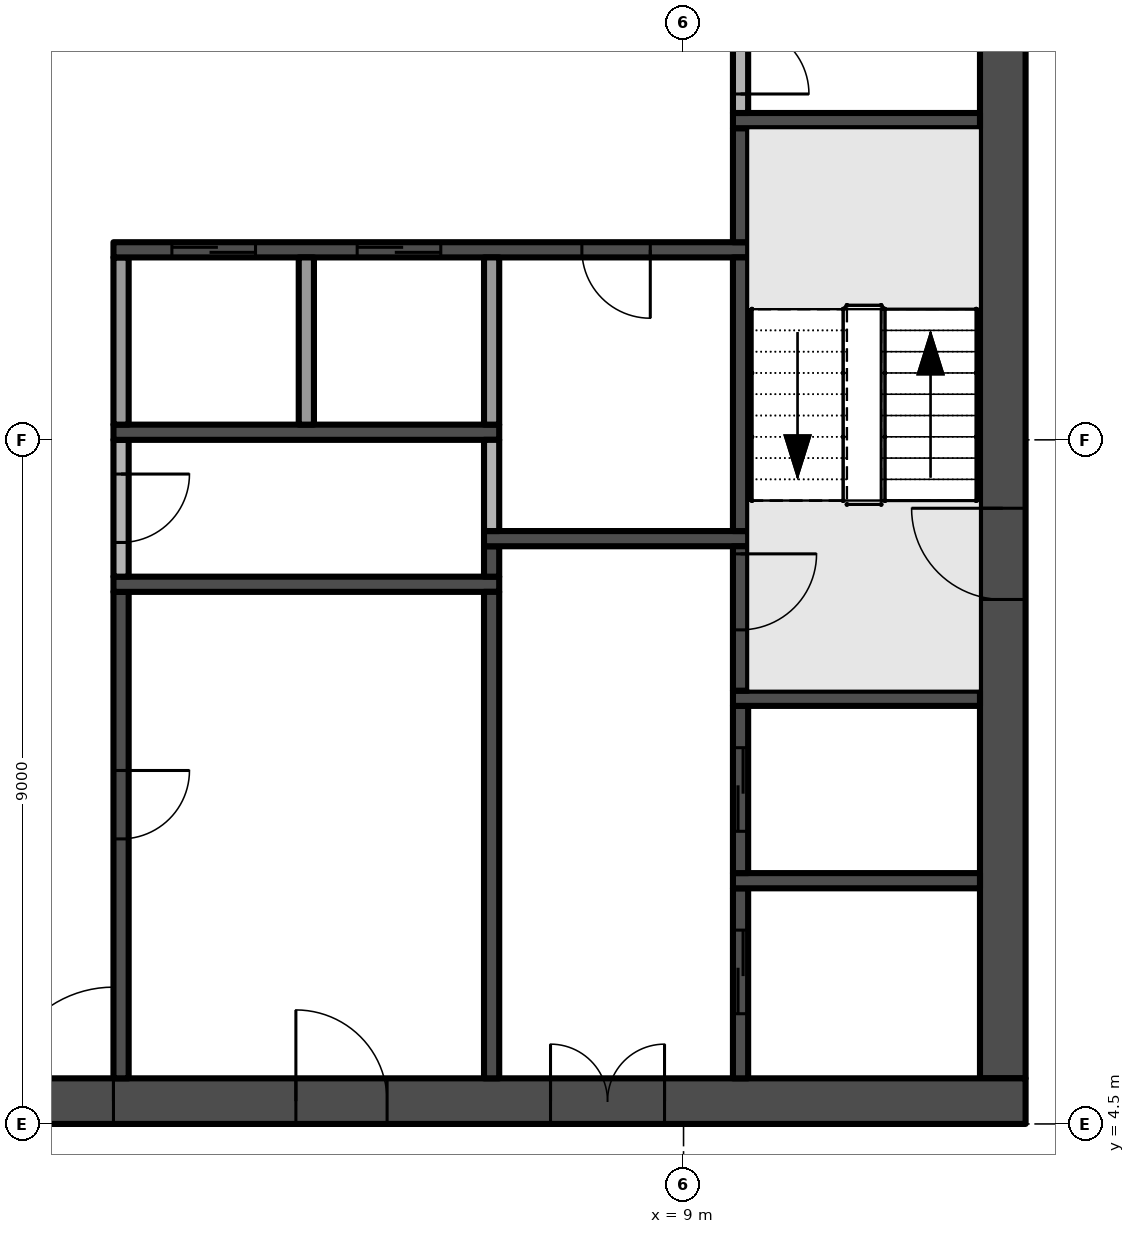
"""IFC4 building model, lengths in metres.
Left out: names, types, materials, properties, quantities, classifications, styles, units other than length and angle.
Written with IfcOpenShell. Run it as: python <this file> out.ifc"""

import sys

from ifc_helpers import new_model, si_unit, direction, frame, frame_2d, origin, place, context, subcontext, project, spatial, rectangle, extrude, element, fill, save


model = new_model("IFC4")
c1 = context("Model", 3, precision=1e-05, world=origin(), true_north=direction((0.0, 1.0)))
c2 = subcontext(c1, "Body", "Model", "MODEL_VIEW")
j1 = project(units=[si_unit("LENGTHUNIT", "METRE"), si_unit("PLANEANGLEUNIT", "RADIAN")], contexts=[c1])
p1 = place(None, origin())
s1 = spatial("IfcSite", under=j1, at=p1, CompositionType="ELEMENT")
p2 = place(p1, origin())
s2 = spatial("IfcBuilding", under=s1, at=p2, CompositionType="ELEMENT")
p3 = place(p2, frame((0.0, 0.0, 284.4)))
s3 = spatial("IfcBuildingStorey", under=s2, at=p3, CompositionType="ELEMENT", Elevation=284.4)
p4 = place(p3, frame((-13.5, 4.8, -0.3), z_axis=(0.0, 0.0, 1.0), x_axis=(1.0, 0.0, 0.0)))
e1 = element("IfcWall", 1, at=p4, inside=s3, PredefinedType="SHEAR", context=c2, shape_type="SweptSolid", body=[
    extrude(rectangle(XDim=27.0, YDim=0.6, at=frame_2d((13.5, 0.0))), origin(), (0.0, 0.0, 1.0), 5.0),
])
p5 = place(p4, frame((12.0, 0.0, 0.3)))
e2 = element("IfcOpeningElement", 2, at=p5, cuts=e1, PredefinedType="OPENING", context=c2, shape_type="SweptSolid", body=[
    extrude(rectangle(XDim=3.0, YDim=2.4, at=frame_2d((1.5, 1.2))), frame((0.0, 0.31, 0.0), z_axis=(0.0, -1.0, 0.0), x_axis=(1.0, 0.0, 0.0)), (0.0, 0.0, 1.0), 0.62),
])
p6 = place(p4, frame((4.9, 0.0, 0.3)))
e3 = element("IfcOpeningElement", 3, at=p6, cuts=e1, PredefinedType="OPENING", context=c2, shape_type="SweptSolid", body=[
    extrude(rectangle(XDim=1.2, YDim=2.2, at=frame_2d((0.6, 1.1))), frame((0.0, 0.31, 0.0), z_axis=(0.0, -1.0, 0.0), x_axis=(1.0, 0.0, 0.0)), (0.0, 0.0, 1.0), 0.62),
])
p7 = place(p4, frame((20.75, 0.0, 0.3)))
e4 = element("IfcOpeningElement", 4, at=p7, cuts=e1, PredefinedType="OPENING", context=c2, shape_type="SweptSolid", body=[
    extrude(rectangle(XDim=1.5, YDim=2.2, at=frame_2d((0.75, 1.1))), frame((0.0, 0.31, 0.0), z_axis=(0.0, -1.0, 0.0), x_axis=(1.0, 0.0, 0.0)), (0.0, 0.0, 1.0), 0.62),
])
p8 = place(p4, frame((17.4, 0.0, 0.3)))
e5 = element("IfcOpeningElement", 5, at=p8, cuts=e1, PredefinedType="OPENING", context=c2, shape_type="SweptSolid", body=[
    extrude(rectangle(XDim=1.2, YDim=2.2, at=frame_2d((0.6, 1.1))), frame((0.0, 0.31, 0.0), z_axis=(0.0, -1.0, 0.0), x_axis=(1.0, 0.0, 0.0)), (0.0, 0.0, 1.0), 0.62),
])
p9 = place(p3, frame((13.2, 5.1, -0.3), z_axis=(0.0, 0.0, 1.0), x_axis=(0.0, 1.0, 0.0)))
e6 = element("IfcWall", 6, at=p9, inside=s3, PredefinedType="SHEAR", context=c2, shape_type="SweptSolid", body=[
    extrude(rectangle(XDim=16.8, YDim=0.6, at=frame_2d((8.4, 0.0))), origin(), (0.0, 0.0, 1.0), 5.0),
])
p10 = place(p9, frame((6.3, 0.0, 0.3)))
e7 = element("IfcOpeningElement", 7, at=p10, cuts=e6, PredefinedType="OPENING", context=c2, shape_type="SweptSolid", body=[
    extrude(rectangle(XDim=1.2, YDim=2.2, at=frame_2d((0.6, 1.1))), frame((0.0, 0.31, 0.0), z_axis=(0.0, -1.0, 0.0), x_axis=(1.0, 0.0, 0.0)), (0.0, 0.0, 1.0), 0.62),
])
p11 = place(p3, frame((1.6, 11.5, 0.0), z_axis=(0.0, 0.0, 1.0), x_axis=(0.0, -1.0, 0.0)))
e8 = element("IfcWall", 8, at=p11, inside=s3, PredefinedType="SHEAR", context=c2, shape_type="SweptSolid", body=[
    extrude(rectangle(XDim=6.4, YDim=0.2, at=frame_2d((3.2, 0.0))), origin(), (0.0, 0.0, 1.0), 4.7),
])
p12 = place(p11, frame((2.35, 0.0, 0.0)))
e9 = element("IfcOpeningElement", 9, at=p12, cuts=e8, PredefinedType="OPENING", context=c2, shape_type="SweptSolid", body=[
    extrude(rectangle(XDim=0.9, YDim=2.1, at=frame_2d((0.45, 1.05))), frame((0.0, 0.11, 0.0), z_axis=(0.0, -1.0, 0.0), x_axis=(1.0, 0.0, 0.0)), (0.0, 0.0, 1.0), 0.22),
])
p13 = place(p3, frame((1.5, 11.6, 0.0), z_axis=(0.0, 0.0, 1.0), x_axis=(1.0, 0.0, 0.0)))
e10 = element("IfcWall", 10, at=p13, inside=s3, PredefinedType="SHEAR", context=c2, shape_type="SweptSolid", body=[
    extrude(rectangle(XDim=5.075, YDim=0.2, at=frame_2d((2.538, 0.0))), origin(), (0.0, 0.0, 1.0), 4.7),
])
p14 = place(p3, frame((1.6, 13.5, 0.0), z_axis=(0.0, 0.0, 1.0), x_axis=(0.0, -1.0, 0.0)))
e11 = element("IfcWall", 11, at=p14, inside=s3, PredefinedType="PARTITIONING", context=c2, shape_type="SweptSolid", body=[
    extrude(rectangle(XDim=1.8, YDim=0.2, at=frame_2d((0.9, 0.0))), origin(), (0.0, 0.0, 1.0), 4.7),
])
p15 = place(p14, frame((0.45, 0.0, 0.0)))
e12 = element("IfcOpeningElement", 12, at=p15, cuts=e11, PredefinedType="OPENING", context=c2, shape_type="SweptSolid", body=[
    extrude(rectangle(XDim=0.9, YDim=2.1, at=frame_2d((0.45, 1.05))), frame((0.0, 0.11, 0.0), z_axis=(0.0, -1.0, 0.0), x_axis=(1.0, 0.0, 0.0)), (0.0, 0.0, 1.0), 0.22),
])
p16 = place(p3, frame((1.5, 13.6, 0.0), z_axis=(0.0, 0.0, 1.0), x_axis=(1.0, 0.0, 0.0)))
e13 = element("IfcWall", 13, at=p16, inside=s3, PredefinedType="SHEAR", context=c2, shape_type="SweptSolid", body=[
    extrude(rectangle(XDim=5.075, YDim=0.2, at=frame_2d((2.538, 0.0))), origin(), (0.0, 0.0, 1.0), 4.7),
])
p17 = place(p3, frame((1.6, 13.7, 0.0), z_axis=(0.0, 0.0, 1.0), x_axis=(0.0, 1.0, 0.0)))
e14 = element("IfcWall", 14, at=p17, inside=s3, PredefinedType="PARTITIONING", context=c2, shape_type="SweptSolid", body=[
    extrude(rectangle(XDim=2.2, YDim=0.2, at=frame_2d((1.1, 0.0))), origin(), (0.0, 0.0, 1.0), 4.7),
])
p18 = place(p3, frame((9.85, 16.0, 0.0), z_axis=(0.0, 0.0, 1.0), x_axis=(-1.0, 0.0, 0.0)))
e15 = element("IfcWall", 15, at=p18, inside=s3, PredefinedType="SHEAR", context=c2, shape_type="SweptSolid", body=[
    extrude(rectangle(XDim=8.35, YDim=0.2, at=frame_2d((4.175, 0.0))), origin(), (0.0, 0.0, 1.0), 4.7),
])
p19 = place(p18, frame((6.481, 0.0, 0.0)))
e16 = element("IfcOpeningElement", 16, at=p19, cuts=e15, PredefinedType="OPENING", context=c2, shape_type="SweptSolid", body=[
    extrude(rectangle(XDim=1.1, YDim=2.1, at=frame_2d((0.55, 1.05))), frame((0.0, 0.11, 0.0), z_axis=(0.0, -1.0, 0.0), x_axis=(1.0, 0.0, 0.0)), (0.0, 0.0, 1.0), 0.22),
])
p20 = place(p18, frame((4.044, 0.0, 0.0)))
e17 = element("IfcOpeningElement", 17, at=p20, cuts=e15, PredefinedType="OPENING", context=c2, shape_type="SweptSolid", body=[
    extrude(rectangle(XDim=1.1, YDim=2.1, at=frame_2d((0.55, 1.05))), frame((0.0, 0.11, 0.0), z_axis=(0.0, -1.0, 0.0), x_axis=(1.0, 0.0, 0.0)), (0.0, 0.0, 1.0), 0.22),
])
p21 = place(p18, frame((1.288, 0.0, 0.0)))
e18 = element("IfcOpeningElement", 18, at=p21, cuts=e15, PredefinedType="OPENING", context=c2, shape_type="SweptSolid", body=[
    extrude(rectangle(XDim=0.9, YDim=2.1, at=frame_2d((0.45, 1.05))), frame((0.0, 0.11, 0.0), z_axis=(0.0, -1.0, 0.0), x_axis=(1.0, 0.0, 0.0)), (0.0, 0.0, 1.0), 0.22),
])
p22 = place(p3, frame((4.037, 13.7, 0.0), z_axis=(0.0, 0.0, 1.0), x_axis=(0.0, 1.0, 0.0)))
e19 = element("IfcWall", 19, at=p22, inside=s3, PredefinedType="PARTITIONING", context=c2, shape_type="SweptSolid", body=[
    extrude(rectangle(XDim=2.2, YDim=0.2, at=frame_2d((1.1, 0.0))), origin(), (0.0, 0.0, 1.0), 4.7),
])
p23 = place(p3, frame((6.475, 5.1, 0.0), z_axis=(0.0, 0.0, 1.0), x_axis=(0.0, 1.0, 0.0)))
e20 = element("IfcWall", 20, at=p23, inside=s3, PredefinedType="SHEAR", context=c2, shape_type="SweptSolid", body=[
    extrude(rectangle(XDim=6.4, YDim=0.2, at=frame_2d((3.2, 0.0))), origin(), (0.0, 0.0, 1.0), 4.7),
])
p24 = place(p3, frame((6.475, 11.7, 0.0), z_axis=(0.0, 0.0, 1.0), x_axis=(0.0, 1.0, 0.0)))
e21 = element("IfcWall", 21, at=p24, inside=s3, PredefinedType="SHEAR", context=c2, shape_type="SweptSolid", body=[
    extrude(rectangle(XDim=0.4, YDim=0.2, at=frame_2d((0.2, 0.0))), origin(), (0.0, 0.0, 1.0), 4.7),
])
p25 = place(p3, frame((6.375, 12.2, 0.0), z_axis=(0.0, 0.0, 1.0), x_axis=(1.0, 0.0, 0.0)))
e22 = element("IfcWall", 22, at=p25, inside=s3, PredefinedType="SHEAR", context=c2, shape_type="SweptSolid", body=[
    extrude(rectangle(XDim=3.475, YDim=0.2, at=frame_2d((1.738, 0.0))), origin(), (0.0, 0.0, 1.0), 4.7),
])
p26 = place(p3, frame((6.475, 12.3, 0.0), z_axis=(0.0, 0.0, 1.0), x_axis=(0.0, 1.0, 0.0)))
e23 = element("IfcWall", 23, at=p26, inside=s3, PredefinedType="PARTITIONING", context=c2, shape_type="SweptSolid", body=[
    extrude(rectangle(XDim=1.2, YDim=0.2, at=frame_2d((0.6, 0.0))), origin(), (0.0, 0.0, 1.0), 4.7),
])
p27 = place(p3, frame((6.475, 13.7, 0.0), z_axis=(0.0, 0.0, 1.0), x_axis=(0.0, 1.0, 0.0)))
e24 = element("IfcWall", 24, at=p27, inside=s3, PredefinedType="PARTITIONING", context=c2, shape_type="SweptSolid", body=[
    extrude(rectangle(XDim=2.2, YDim=0.2, at=frame_2d((1.1, 0.0))), origin(), (0.0, 0.0, 1.0), 4.7),
])
p28 = place(p3, frame((9.75, 5.1, 0.0), z_axis=(0.0, 0.0, 1.0), x_axis=(0.0, 1.0, 0.0)))
e25 = element("IfcWall", 25, at=p28, inside=s3, PredefinedType="SHEAR", context=c2, shape_type="SweptSolid", body=[
    extrude(rectangle(XDim=2.5, YDim=0.2, at=frame_2d((1.25, 0.0))), origin(), (0.0, 0.0, 1.0), 4.7),
])
p29 = place(p28, frame((0.85, 0.0, 0.0)))
e26 = element("IfcOpeningElement", 26, at=p29, cuts=e25, PredefinedType="OPENING", context=c2, shape_type="SweptSolid", body=[
    extrude(rectangle(XDim=1.1, YDim=2.1, at=frame_2d((0.55, 1.05))), frame((0.0, 0.11, 0.0), z_axis=(0.0, -1.0, 0.0), x_axis=(1.0, 0.0, 0.0)), (0.0, 0.0, 1.0), 0.22),
])
p30 = place(p3, frame((9.65, 7.7, 0.0), z_axis=(0.0, 0.0, 1.0), x_axis=(1.0, 0.0, 0.0)))
e27 = element("IfcWall", 27, at=p30, inside=s3, PredefinedType="SHEAR", context=c2, shape_type="SweptSolid", body=[
    extrude(rectangle(XDim=3.25, YDim=0.2, at=frame_2d((1.625, 0.0))), origin(), (0.0, 0.0, 1.0), 4.7),
])
p31 = place(p3, frame((9.75, 7.8, 0.0), z_axis=(0.0, 0.0, 1.0), x_axis=(0.0, 1.0, 0.0)))
e28 = element("IfcWall", 28, at=p31, inside=s3, PredefinedType="SHEAR", context=c2, shape_type="SweptSolid", body=[
    extrude(rectangle(XDim=2.2, YDim=0.2, at=frame_2d((1.1, 0.0))), origin(), (0.0, 0.0, 1.0), 4.7),
])
p32 = place(p31, frame((0.55, 0.0, 0.0)))
e29 = element("IfcOpeningElement", 29, at=p32, cuts=e28, PredefinedType="OPENING", context=c2, shape_type="SweptSolid", body=[
    extrude(rectangle(XDim=1.1, YDim=2.1, at=frame_2d((0.55, 1.05))), frame((0.0, 0.11, 0.0), z_axis=(0.0, -1.0, 0.0), x_axis=(1.0, 0.0, 0.0)), (0.0, 0.0, 1.0), 0.22),
])
p33 = place(p3, frame((9.65, 10.1, 0.0), z_axis=(0.0, 0.0, 1.0), x_axis=(1.0, 0.0, 0.0)))
e30 = element("IfcWall", 30, at=p33, inside=s3, PredefinedType="SHEAR", context=c2, shape_type="SweptSolid", body=[
    extrude(rectangle(XDim=3.25, YDim=0.2, at=frame_2d((1.625, 0.0))), origin(), (0.0, 0.0, 1.0), 4.7),
])
p34 = place(p3, frame((9.75, 12.1, 0.0), z_axis=(0.0, 0.0, 1.0), x_axis=(0.0, -1.0, 0.0)))
e31 = element("IfcWall", 31, at=p34, inside=s3, PredefinedType="SHEAR", context=c2, shape_type="SweptSolid", body=[
    extrude(rectangle(XDim=1.9, YDim=0.2, at=frame_2d((0.95, 0.0))), origin(), (0.0, 0.0, 1.0), 4.7),
])
p35 = place(p34, frame((0.1, 0.0, 0.0)))
e32 = element("IfcOpeningElement", 32, at=p35, cuts=e31, PredefinedType="OPENING", context=c2, shape_type="SweptSolid", body=[
    extrude(rectangle(XDim=1.0, YDim=2.2, at=frame_2d((0.5, 1.1))), frame((0.0, 0.11, 0.0), z_axis=(0.0, -1.0, 0.0), x_axis=(1.0, 0.0, 0.0)), (0.0, 0.0, 1.0), 0.22),
])
p36 = place(p3, frame((9.75, 12.3, 0.0), z_axis=(0.0, 0.0, 1.0), x_axis=(0.0, 1.0, 0.0)))
e33 = element("IfcWall", 33, at=p36, inside=s3, PredefinedType="SHEAR", context=c2, shape_type="SweptSolid", body=[
    extrude(rectangle(XDim=3.6, YDim=0.2, at=frame_2d((1.8, 0.0))), origin(), (0.0, 0.0, 1.0), 4.7),
])
p37 = place(p3, frame((9.75, 16.1, 0.0), z_axis=(0.0, 0.0, 1.0), x_axis=(0.0, 1.0, 0.0)))
e34 = element("IfcWall", 34, at=p37, inside=s3, PredefinedType="SHEAR", context=c2, shape_type="SweptSolid", body=[
    extrude(rectangle(XDim=1.5, YDim=0.2, at=frame_2d((0.75, 0.0))), origin(), (0.0, 0.0, 1.0), 4.7),
])
p38 = place(p3, frame((9.65, 17.7, 0.0), z_axis=(0.0, 0.0, 1.0), x_axis=(1.0, 0.0, 0.0)))
e35 = element("IfcWall", 35, at=p38, inside=s3, PredefinedType="SHEAR", context=c2, shape_type="SweptSolid", body=[
    extrude(rectangle(XDim=3.25, YDim=0.2, at=frame_2d((1.625, 0.0))), origin(), (0.0, 0.0, 1.0), 4.7),
])
p39 = place(p3, frame((9.75, 19.2, 0.0), z_axis=(0.0, 0.0, 1.0), x_axis=(0.0, -1.0, 0.0)))
e36 = element("IfcWall", 36, at=p39, inside=s3, PredefinedType="PARTITIONING", context=c2, shape_type="SweptSolid", body=[
    extrude(rectangle(XDim=1.4, YDim=0.2, at=frame_2d((0.7, 0.0))), origin(), (0.0, 0.0, 1.0), 4.7),
])
p40 = place(p39, frame((0.25, 0.0, 0.0)))
e37 = element("IfcOpeningElement", 37, at=p40, cuts=e36, PredefinedType="OPENING", context=c2, shape_type="SweptSolid", body=[
    extrude(rectangle(XDim=0.9, YDim=2.1, at=frame_2d((0.45, 1.05))), frame((0.0, 0.11, 0.0), z_axis=(0.0, -1.0, 0.0), x_axis=(1.0, 0.0, 0.0)), (0.0, 0.0, 1.0), 0.22),
])
p41 = place(p5, frame((3.0, 0.0, 0.0), z_axis=(0.0, 0.0, 1.0), x_axis=(-1.0, 0.0, 0.0)))
e38 = element("IfcDoor", 38, at=p41, inside=s3, OperationType="DOUBLE_DOOR_SINGLE_SWING", PredefinedType="DOOR", context=c2, shape_type="SweptSolid", body=[
    extrude(rectangle(XDim=3.0, YDim=2.4, at=frame_2d((1.5, 1.2))), frame((0.0, 0.025, 0.0), z_axis=(0.0, -1.0, 0.0), x_axis=(1.0, 0.0, 0.0)), (0.0, 0.0, 1.0), 0.05),
])
fill(e2, e38)
p42 = place(p10, frame((1.2, 0.0, 0.0), z_axis=(0.0, 0.0, 1.0), x_axis=(-1.0, 0.0, 0.0)))
e39 = element("IfcDoor", 39, at=p42, inside=s3, OperationType="SINGLE_SWING_LEFT", PredefinedType="DOOR", context=c2, shape_type="SweptSolid", body=[
    extrude(rectangle(XDim=1.2, YDim=2.2, at=frame_2d((0.6, 1.1))), frame((0.0, 0.025, 0.0), z_axis=(0.0, -1.0, 0.0), x_axis=(1.0, 0.0, 0.0)), (0.0, 0.0, 1.0), 0.05),
])
fill(e7, e39)
p43 = place(p7, frame((1.5, 0.0, 0.0), z_axis=(0.0, 0.0, 1.0), x_axis=(-1.0, 0.0, 0.0)))
e40 = element("IfcDoor", 40, at=p43, inside=s3, OperationType="DOUBLE_DOOR_SINGLE_SWING", PredefinedType="DOOR", context=c2, shape_type="SweptSolid", body=[
    extrude(rectangle(XDim=1.5, YDim=2.2, at=frame_2d((0.75, 1.1))), frame((0.0, 0.025, 0.0), z_axis=(0.0, -1.0, 0.0), x_axis=(1.0, 0.0, 0.0)), (0.0, 0.0, 1.0), 0.05),
])
fill(e4, e40)
p44 = place(p8, frame((1.2, 0.0, 0.0), z_axis=(0.0, 0.0, 1.0), x_axis=(-1.0, 0.0, 0.0)))
e41 = element("IfcDoor", 41, at=p44, inside=s3, OperationType="SINGLE_SWING_RIGHT", PredefinedType="DOOR", context=c2, shape_type="SweptSolid", body=[
    extrude(rectangle(XDim=1.2, YDim=2.2, at=frame_2d((0.6, 1.1))), frame((0.0, 0.025, 0.0), z_axis=(0.0, -1.0, 0.0), x_axis=(1.0, 0.0, 0.0)), (0.0, 0.0, 1.0), 0.05),
])
fill(e5, e41)
p45 = place(p35, origin())
e42 = element("IfcDoor", 42, at=p45, inside=s3, OperationType="SINGLE_SWING_LEFT", PredefinedType="DOOR", context=c2, shape_type="SweptSolid", body=[
    extrude(rectangle(XDim=1.0, YDim=2.2, at=frame_2d((0.5, 1.1))), frame((0.0, 0.025, 0.0), z_axis=(0.0, -1.0, 0.0), x_axis=(1.0, 0.0, 0.0)), (0.0, 0.0, 1.0), 0.05),
])
fill(e32, e42)
p46 = place(p19, origin())
e43 = element("IfcDoor", 43, at=p46, inside=s3, OperationType="SLIDING_TO_RIGHT", PredefinedType="DOOR", context=c2, shape_type="SweptSolid", body=[
    extrude(rectangle(XDim=1.1, YDim=2.1, at=frame_2d((0.55, 1.05))), frame((0.0, 0.025, 0.0), z_axis=(0.0, -1.0, 0.0), x_axis=(1.0, 0.0, 0.0)), (0.0, 0.0, 1.0), 0.05),
])
fill(e16, e43)
p47 = place(p20, origin())
e44 = element("IfcDoor", 44, at=p47, inside=s3, OperationType="SLIDING_TO_RIGHT", PredefinedType="DOOR", context=c2, shape_type="SweptSolid", body=[
    extrude(rectangle(XDim=1.1, YDim=2.1, at=frame_2d((0.55, 1.05))), frame((0.0, 0.025, 0.0), z_axis=(0.0, -1.0, 0.0), x_axis=(1.0, 0.0, 0.0)), (0.0, 0.0, 1.0), 0.05),
])
fill(e17, e44)
p48 = place(p29, origin())
e45 = element("IfcDoor", 45, at=p48, inside=s3, OperationType="SLIDING_TO_RIGHT", PredefinedType="DOOR", context=c2, shape_type="SweptSolid", body=[
    extrude(rectangle(XDim=1.1, YDim=2.1, at=frame_2d((0.55, 1.05))), frame((0.0, 0.025, 0.0), z_axis=(0.0, -1.0, 0.0), x_axis=(1.0, 0.0, 0.0)), (0.0, 0.0, 1.0), 0.05),
])
fill(e26, e45)
p49 = place(p32, origin())
e46 = element("IfcDoor", 46, at=p49, inside=s3, OperationType="SLIDING_TO_RIGHT", PredefinedType="DOOR", context=c2, shape_type="SweptSolid", body=[
    extrude(rectangle(XDim=1.1, YDim=2.1, at=frame_2d((0.55, 1.05))), frame((0.0, 0.025, 0.0), z_axis=(0.0, -1.0, 0.0), x_axis=(1.0, 0.0, 0.0)), (0.0, 0.0, 1.0), 0.05),
])
fill(e29, e46)
p50 = place(p12, origin())
e47 = element("IfcDoor", 47, at=p50, inside=s3, OperationType="SINGLE_SWING_LEFT", PredefinedType="DOOR", context=c2, shape_type="SweptSolid", body=[
    extrude(rectangle(XDim=0.9, YDim=2.1, at=frame_2d((0.45, 1.05))), frame((0.0, 0.025, 0.0), z_axis=(0.0, -1.0, 0.0), x_axis=(1.0, 0.0, 0.0)), (0.0, 0.0, 1.0), 0.05),
])
fill(e9, e47)
p51 = place(p15, origin())
e48 = element("IfcDoor", 48, at=p51, inside=s3, OperationType="SINGLE_SWING_LEFT", PredefinedType="DOOR", context=c2, shape_type="SweptSolid", body=[
    extrude(rectangle(XDim=0.9, YDim=2.1, at=frame_2d((0.45, 1.05))), frame((0.0, 0.025, 0.0), z_axis=(0.0, -1.0, 0.0), x_axis=(1.0, 0.0, 0.0)), (0.0, 0.0, 1.0), 0.05),
])
fill(e12, e48)
p52 = place(p21, origin())
e49 = element("IfcDoor", 49, at=p52, inside=s3, OperationType="SINGLE_SWING_LEFT", PredefinedType="DOOR", context=c2, shape_type="SweptSolid", body=[
    extrude(rectangle(XDim=0.9, YDim=2.1, at=frame_2d((0.45, 1.05))), frame((0.0, 0.025, 0.0), z_axis=(0.0, -1.0, 0.0), x_axis=(1.0, 0.0, 0.0)), (0.0, 0.0, 1.0), 0.05),
])
fill(e18, e49)
p53 = place(p40, origin())
e50 = element("IfcDoor", 50, at=p53, inside=s3, OperationType="SINGLE_SWING_RIGHT", PredefinedType="DOOR", context=c2, shape_type="SweptSolid", body=[
    extrude(rectangle(XDim=0.9, YDim=2.1, at=frame_2d((0.45, 1.05))), frame((0.0, 0.025, 0.0), z_axis=(0.0, -1.0, 0.0), x_axis=(1.0, 0.0, 0.0)), (0.0, 0.0, 1.0), 0.05),
])
fill(e37, e50)
save(model, sys.argv[1])
